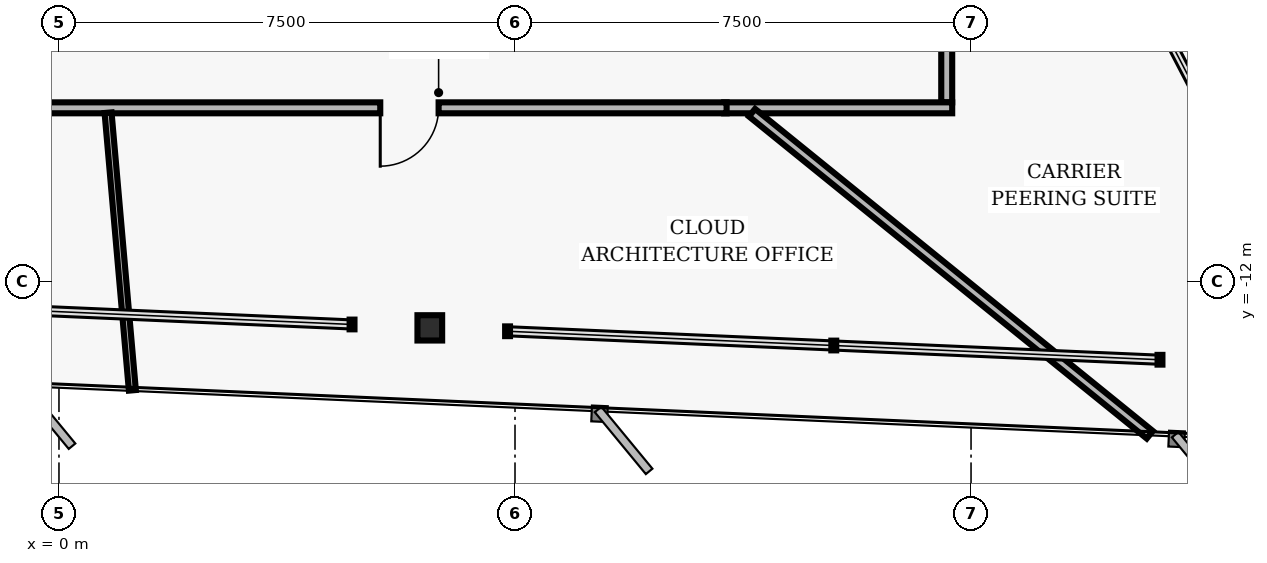
"""IFC4 building model, lengths in metres.
Left out: names, types, materials, properties, quantities, classifications, styles, units other than length and angle.
Written with IfcOpenShell. Run it as: python <this file> out.ifc"""

import sys

from ifc_helpers import new_model, si_unit, direction, frame, frame_2d, origin, origin_2d, place, context, subcontext, project, spatial, rectangle, i_section, extrude, element, fill, save


model = new_model("IFC4")
c1 = context("Model", 3, precision=1e-05, world=origin(), true_north=direction((0.0, 1.0)))
c2 = subcontext(c1, "Body", "Model", "MODEL_VIEW")
j1 = project(units=[si_unit("LENGTHUNIT", "METRE"), si_unit("PLANEANGLEUNIT", "RADIAN")], contexts=[c1])
p1 = place(None, origin())
s1 = spatial("IfcSite", under=j1, at=p1, CompositionType="ELEMENT")
p2 = place(p1, origin())
s2 = spatial("IfcBuilding", under=s1, at=p2, CompositionType="ELEMENT")
p3 = place(p2, frame((0.0, 0.0, 128.96)))
s3 = spatial("IfcBuildingStorey", under=s2, at=p3, CompositionType="ELEMENT", Elevation=128.96)
p4 = place(p3, frame((6.099, -12.769, 0.0), z_axis=(0.0, 0.0, 1.0), x_axis=(1.0, 0.0, 0.0)))
e1 = element("IfcColumn", 1, at=p4, inside=s3, PredefinedType="COLUMN", context=c2, shape_type="SweptSolid", body=[
    extrude(i_section(OverallWidth=0.406, OverallDepth=0.416, WebThickness=0.03, FlangeThickness=0.048, FilletRadius=0.02, at=origin_2d()), origin(), (0.0, 0.0, 1.0), 3.04),
])
p5 = place(p3, frame((14.6, -7.18, 0.0), z_axis=(0.0, 0.0, 1.0), x_axis=(0.0, -1.0, 0.0)))
e2 = element("IfcWall", 2, at=p5, inside=s3, PredefinedType="PARTITIONING", context=c2, shape_type="SweptSolid", body=[
    extrude(rectangle(XDim=1.88, YDim=0.18, at=frame_2d((0.94, 0.0))), origin(), (0.0, 0.0, 1.0), 2.763),
])
p6 = place(p3, frame((14.69, -9.15, 0.0), z_axis=(0.0, 0.0, 1.0), x_axis=(-1.0, 0.0, 0.0)))
e3 = element("IfcWall", 3, at=p6, inside=s3, PredefinedType="PARTITIONING", context=c2, shape_type="SweptSolid", body=[
    extrude(rectangle(XDim=3.75, YDim=0.18, at=frame_2d((1.875, 0.0))), origin(), (0.0, 0.0, 1.0), 2.33),
])
p7 = place(p3, frame((10.98, -9.15, 0.0), z_axis=(0.0, 0.0, 1.0), x_axis=(-1.0, 0.0, 0.0)))
e4 = element("IfcWall", 4, at=p7, inside=s3, PredefinedType="PARTITIONING", context=c2, shape_type="SweptSolid", body=[
    extrude(rectangle(XDim=17.5, YDim=0.18, at=frame_2d((8.75, 0.0))), origin(), (0.0, 0.0, 1.0), 2.33),
])
p8 = place(p7, frame((13.116, 0.0, 0.0)))
e5 = element("IfcOpeningElement", 5, at=p8, cuts=e4, PredefinedType="OPENING", context=c2, shape_type="SweptSolid", body=[
    extrude(rectangle(XDim=1.18, YDim=2.02, at=frame_2d((0.59, 1.01))), frame((0.0, 0.1, 0.0), z_axis=(0.0, -1.0, 0.0), x_axis=(1.0, 0.0, 0.0)), (0.0, 0.0, 1.0), 0.2),
])
p9 = place(p7, frame((4.736, 0.0, 0.0)))
e6 = element("IfcOpeningElement", 6, at=p9, cuts=e4, PredefinedType="OPENING", context=c2, shape_type="SweptSolid", body=[
    extrude(rectangle(XDim=0.96, YDim=2.02, at=frame_2d((0.48, 1.01))), frame((0.0, 0.1, 0.0), z_axis=(0.0, -1.0, 0.0), x_axis=(1.0, 0.0, 0.0)), (0.0, 0.0, 1.0), 0.2),
])
p10 = place(p3, frame((0.808, -9.23, 0.0), z_axis=(0.0, 0.0, 1.0), x_axis=(0.087130613331, -0.996196896311, 0.0)))
e7 = element("IfcWall", 7, at=p10, inside=s3, PredefinedType="MOVABLE", context=c2, shape_type="SweptSolid", body=[
    extrude(rectangle(XDim=4.584, YDim=0.115, at=frame_2d((2.292, 0.0))), origin(), (0.0, 0.0, 1.0), 2.763),
])
p11 = place(p3, frame((11.398, -9.23, 0.0), z_axis=(0.0, 0.0, 1.0), x_axis=(0.777150974354, -0.629314200588, 0.0)))
e8 = element("IfcWall", 8, at=p11, inside=s3, PredefinedType="PARTITIONING", context=c2, shape_type="SweptSolid", body=[
    extrude(rectangle(XDim=8.417, YDim=0.16, at=frame_2d((4.208, 0.0))), origin(), (0.0, 0.0, 1.0), 2.763),
])
p12 = place(p9, origin())
e9 = element("IfcDoor", 9, at=p12, inside=s3, OperationType="SINGLE_SWING_RIGHT", PredefinedType="DOOR", context=c2, shape_type="SweptSolid", body=[
    extrude(rectangle(XDim=0.96, YDim=2.02, at=frame_2d((0.48, 1.01))), frame((0.0, 0.025, 0.0), z_axis=(0.0, -1.0, 0.0), x_axis=(1.0, 0.0, 0.0)), (0.0, 0.0, 1.0), 0.05),
])
fill(e6, e9)
save(model, sys.argv[1])
